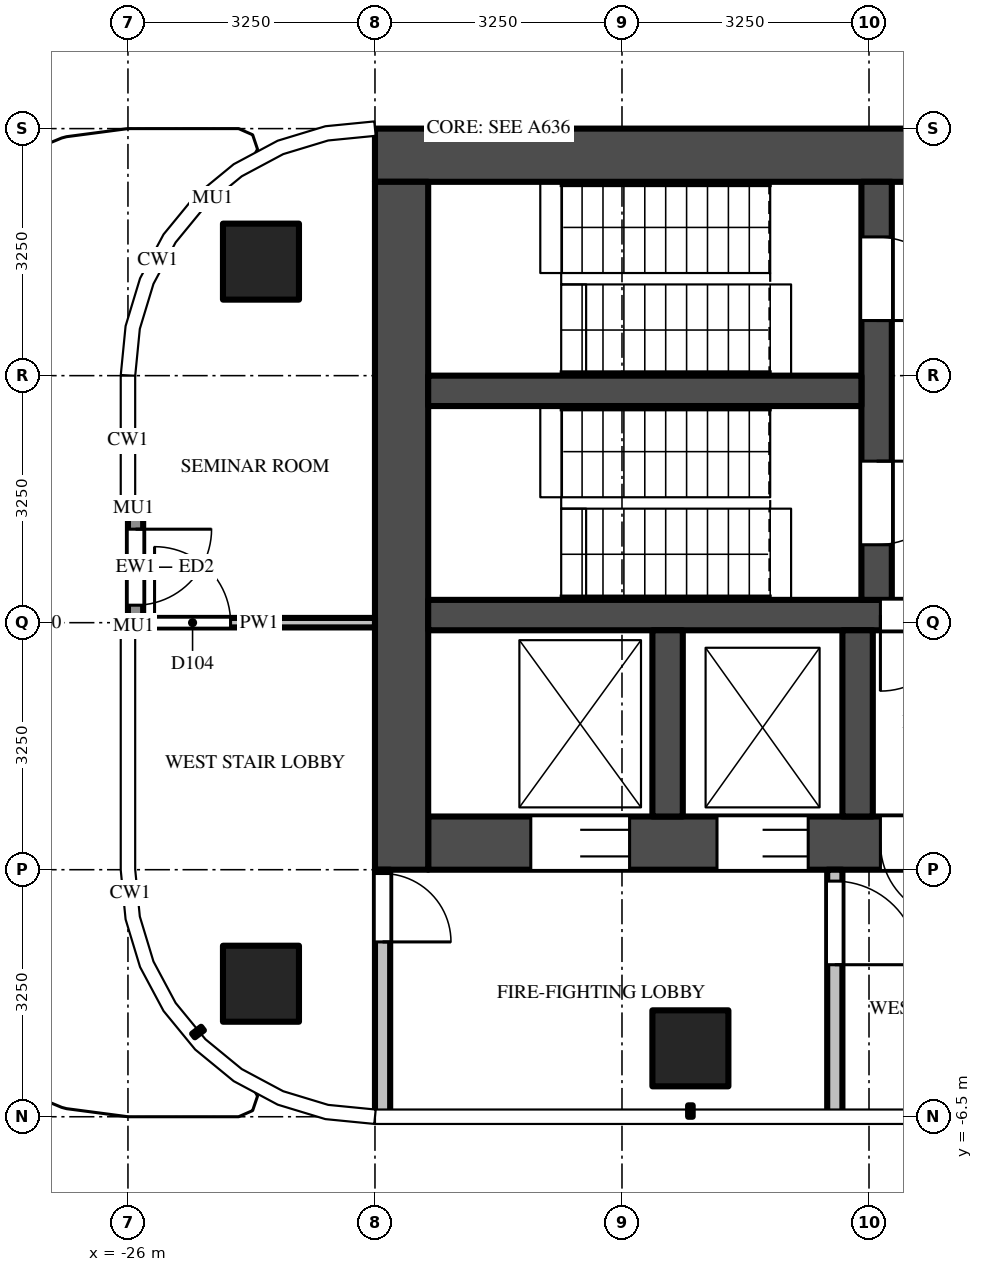
"""IFC4 building model, lengths in metres.
Left out: names, types, materials, properties, quantities, classifications, styles, units other than length and angle.
Written with IfcOpenShell. Run it as: python <this file> out.ifc"""

import sys

from ifc_helpers import new_model, si_unit, direction, frame, frame_2d, origin, origin_2d, place, context, subcontext, project, spatial, rectangle, extrude, source, transform, mapped, element, fill, save


model = new_model("IFC4")
c1 = context("Model", 3, precision=1e-05, world=origin(), true_north=direction((0.0, 1.0)))
c2 = subcontext(c1, "Body", "Model", "MODEL_VIEW")
j1 = project(units=[si_unit("LENGTHUNIT", "METRE"), si_unit("PLANEANGLEUNIT", "RADIAN")], contexts=[c1])
p1 = place(None, origin())
s1 = spatial("IfcSite", under=j1, at=p1, CompositionType="ELEMENT")
p2 = place(p1, origin())
s2 = spatial("IfcBuilding", under=s1, at=p2, CompositionType="ELEMENT")
p3 = place(p2, frame((0.0, 0.0, 279.4)))
s3 = spatial("IfcBuildingStorey", under=s2, at=p3, CompositionType="ELEMENT", Elevation=279.4)
m1 = source(origin(), c2, "Body", "SweptSolid", [
    extrude(rectangle(XDim=1.0, YDim=1.0, at=origin_2d()), origin(), (0.0, 0.0, 1.0), 3.9),
])
for number, where, z_axis, x_axis in (
    (1, (-18.6, -5.6, 0.0), (0.0, 0.0, 1.0), (1.0, 0.0, 0.0)),
    (2, (-24.25, -4.75, 0.0), (0.0, 0.0, 1.0), (1.0, 0.0, 0.0)),
    (3, (-24.25, 4.75, 0.0), (0.0, 0.0, 1.0), (1.0, 0.0, 0.0)),
):
    element("IfcColumn", number, at=place(p3, frame(where, z_axis=z_axis, x_axis=x_axis)), inside=s3, PredefinedType="COLUMN", context=c2, shape_type="MappedRepresentation", body=[
        mapped(m1, transform((0.0, 0.0, 0.0))),
    ])
m2 = source(origin(), c2, "Body", "SweptSolid", [
    extrude(rectangle(XDim=16.65, YDim=0.7, at=frame_2d((8.325, 0.0))), origin(), (0.0, 0.0, 1.0), 3.7),
])
p4 = place(p3, frame((-6.1, 6.15, 0.0), z_axis=(0.0, 0.0, 1.0), x_axis=(-1.0, 0.0, 0.0)))
e4 = element("IfcWall", 4, at=p4, inside=s3, PredefinedType="SHEAR", context=c2, shape_type="MappedRepresentation", body=[
    mapped(m2, transform((0.0, 0.0, 0.0))),
])
m3 = source(origin(), c2, "Body", "SweptSolid", [
    extrude(rectangle(XDim=14.85, YDim=0.7, at=frame_2d((7.425, 0.0))), origin(), (0.0, 0.0, 1.0), 3.7),
])
p5 = place(p3, frame((-7.2, -2.9, 0.0), z_axis=(0.0, 0.0, 1.0), x_axis=(-1.0, 0.0, 0.0)))
e5 = element("IfcWall", 5, at=p5, inside=s3, PredefinedType="SHEAR", context=c2, shape_type="MappedRepresentation", body=[
    mapped(m3, transform((0.0, 0.0, 0.0))),
])
m4 = source(origin(), c2, "Body", "SweptSolid", [
    extrude(rectangle(XDim=1.2, YDim=2.1, at=frame_2d((0.6, 1.05))), frame((0.0, 0.36, 0.0), z_axis=(0.0, -1.0, 0.0), x_axis=(1.0, 0.0, 0.0)), (0.0, 0.0, 1.0), 0.72),
])
p6 = place(p5, frame((5.7, 0.0, 0.0)))
e6 = element("IfcOpeningElement", 6, at=p6, cuts=e5, PredefinedType="OPENING", context=c2, shape_type="MappedRepresentation", body=[
    mapped(m4, transform((0.0, 0.0, 0.0))),
])
m5 = source(origin(), c2, "Body", "SweptSolid", [
    extrude(rectangle(XDim=1.3, YDim=2.1, at=frame_2d((0.65, 1.05))), frame((0.0, 0.36, 0.0), z_axis=(0.0, -1.0, 0.0), x_axis=(1.0, 0.0, 0.0)), (0.0, 0.0, 1.0), 0.72),
])
p7 = place(p5, frame((12.2, 0.0, 0.0)))
e7 = element("IfcOpeningElement", 7, at=p7, cuts=e5, PredefinedType="OPENING", context=c2, shape_type="MappedRepresentation", body=[
    mapped(m5, transform((0.0, 0.0, 0.0))),
])
p8 = place(p5, frame((9.85, 0.0, 0.0)))
e8 = element("IfcOpeningElement", 8, at=p8, cuts=e5, PredefinedType="OPENING", context=c2, shape_type="MappedRepresentation", body=[
    mapped(m4, transform((0.0, 0.0, 0.0))),
])
m6 = source(origin(), c2, "Body", "SweptSolid", [
    extrude(rectangle(XDim=1.0, YDim=2.1, at=frame_2d((0.5, 1.05))), frame((0.0, 0.36, 0.0), z_axis=(0.0, -1.0, 0.0), x_axis=(1.0, 0.0, 0.0)), (0.0, 0.0, 1.0), 0.72),
])
p9 = place(p5, frame((7.9, 0.0, 0.0)))
e9 = element("IfcOpeningElement", 9, at=p9, cuts=e5, PredefinedType="OPENING", context=c2, shape_type="MappedRepresentation", body=[
    mapped(m6, transform((0.0, 0.0, 0.0))),
])
m7 = source(origin(), c2, "Body", "SweptSolid", [
    extrude(rectangle(XDim=0.8, YDim=2.1, at=frame_2d((0.4, 1.05))), frame((0.0, 0.36, 0.0), z_axis=(0.0, -1.0, 0.0), x_axis=(1.0, 0.0, 0.0)), (0.0, 0.0, 1.0), 0.72),
])
p10 = place(p5, frame((0.212, 0.0, 0.0)))
e10 = element("IfcOpeningElement", 10, at=p10, cuts=e5, PredefinedType="OPENING", context=c2, shape_type="MappedRepresentation", body=[
    mapped(m7, transform((0.0, 0.0, 0.0))),
])
p11 = place(p5, frame((2.587, 0.0, 0.0)))
e11 = element("IfcOpeningElement", 11, at=p11, cuts=e5, PredefinedType="OPENING", context=c2, shape_type="MappedRepresentation", body=[
    mapped(m6, transform((0.0, 0.0, 0.0))),
])
m8 = source(origin(), c2, "Body", "SweptSolid", [
    extrude(rectangle(XDim=9.05, YDim=0.7, at=frame_2d((4.525, 0.0))), origin(), (0.0, 0.0, 1.0), 3.7),
])
p12 = place(p3, frame((-22.4, 5.8, 0.0), z_axis=(0.0, 0.0, 1.0), x_axis=(0.0, -1.0, 0.0)))
e12 = element("IfcWall", 12, at=p12, inside=s3, PredefinedType="SHEAR", context=c2, shape_type="MappedRepresentation", body=[
    mapped(m8, transform((0.0, 0.0, 0.0))),
])
m9 = source(origin(), c2, "Body", "SweptSolid", [
    extrude(rectangle(XDim=14.85, YDim=0.4, at=frame_2d((7.425, 0.0))), origin(), (0.0, 0.0, 1.0), 3.7),
])
p13 = place(p3, frame((-7.2, 0.1, 0.0), z_axis=(0.0, 0.0, 1.0), x_axis=(-1.0, 0.0, 0.0)))
e13 = element("IfcWall", 13, at=p13, inside=s3, PredefinedType="SHEAR", context=c2, shape_type="MappedRepresentation", body=[
    mapped(m9, transform((0.0, 0.0, 0.0))),
])
m10 = source(origin(), c2, "Body", "SweptSolid", [
    extrude(rectangle(XDim=1.0, YDim=2.1, at=frame_2d((0.5, 1.05))), frame((0.0, 0.21, 0.0), z_axis=(0.0, -1.0, 0.0), x_axis=(1.0, 0.0, 0.0)), (0.0, 0.0, 1.0), 0.42),
])
p14 = place(p13, frame((7.9, 0.0, 0.0)))
e14 = element("IfcOpeningElement", 14, at=p14, cuts=e13, PredefinedType="OPENING", context=c2, shape_type="MappedRepresentation", body=[
    mapped(m10, transform((0.0, 0.0, 0.0))),
])
m11 = source(origin(), c2, "Body", "SweptSolid", [
    extrude(rectangle(XDim=5.5, YDim=0.4, at=frame_2d((2.75, 0.0))), origin(), (0.0, 0.0, 1.0), 3.7),
])
p15 = place(p3, frame((-16.15, 5.8, 0.0), z_axis=(0.0, 0.0, 1.0), x_axis=(0.0, -1.0, 0.0)))
e15 = element("IfcWall", 15, at=p15, inside=s3, PredefinedType="SHEAR", context=c2, shape_type="MappedRepresentation", body=[
    mapped(m11, transform((0.0, 0.0, 0.0))),
])
m12 = source(origin(), c2, "Body", "SweptSolid", [
    extrude(rectangle(XDim=1.1, YDim=2.1, at=frame_2d((0.55, 1.05))), frame((0.0, 0.21, 0.0), z_axis=(0.0, -1.0, 0.0), x_axis=(1.0, 0.0, 0.0)), (0.0, 0.0, 1.0), 0.42),
])
p16 = place(p15, frame((0.725, 0.0, 0.0)))
e16 = element("IfcOpeningElement", 16, at=p16, cuts=e15, PredefinedType="OPENING", context=c2, shape_type="MappedRepresentation", body=[
    mapped(m12, transform((0.0, 0.0, 0.0))),
])
p17 = place(p15, frame((3.675, 0.0, 0.0)))
e17 = element("IfcOpeningElement", 17, at=p17, cuts=e15, PredefinedType="OPENING", context=c2, shape_type="MappedRepresentation", body=[
    mapped(m12, transform((0.0, 0.0, 0.0))),
])
m13 = source(origin(), c2, "Body", "SweptSolid", [
    extrude(rectangle(XDim=5.7, YDim=0.4, at=frame_2d((2.85, 0.0))), origin(), (0.0, 0.0, 1.0), 3.7),
])
p18 = place(p3, frame((-16.35, 3.05, 0.0), z_axis=(0.0, 0.0, 1.0), x_axis=(-1.0, 0.0, 0.0)))
e18 = element("IfcWall", 18, at=p18, inside=s3, PredefinedType="SHEAR", context=c2, shape_type="MappedRepresentation", body=[
    mapped(m13, transform((0.0, 0.0, 0.0))),
])
m14 = source(origin(), c2, "Body", "SweptSolid", [
    extrude(rectangle(XDim=2.45, YDim=0.4, at=frame_2d((1.225, 0.0))), origin(), (0.0, 0.0, 1.0), 3.7),
])
for number, where, z_axis, x_axis in (
    (19, (-16.4, -0.1, 0.0), (0.0, 0.0, 1.0), (0.0, -1.0, 0.0)),
    (20, (-18.9, -0.1, 0.0), (0.0, 0.0, 1.0), (0.0, -1.0, 0.0)),
):
    element("IfcWall", number, at=place(p3, frame(where, z_axis=z_axis, x_axis=x_axis)), inside=s3, PredefinedType="SHEAR", context=c2, shape_type="MappedRepresentation", body=[
        mapped(m14, transform((0.0, 0.0, 0.0))),
    ])
m15 = source(origin(), c2, "Body", "SweptSolid", [
    extrude(rectangle(XDim=3.25, YDim=0.2, at=frame_2d((1.625, 0.0))), origin(), (0.0, 0.0, 1.0), 3.7),
])
p19 = place(p3, frame((-16.7, -3.25, 0.0), z_axis=(0.0, 0.0, 1.0), x_axis=(0.0, -1.0, 0.0)))
e21 = element("IfcWall", 21, at=p19, inside=s3, PredefinedType="PARTITIONING", context=c2, shape_type="MappedRepresentation", body=[
    mapped(m15, transform((0.0, 0.0, 0.0))),
])
m16 = source(origin(), c2, "Body", "SweptSolid", [
    extrude(rectangle(XDim=1.1, YDim=2.1, at=frame_2d((0.55, 1.05))), frame((0.0, 0.11, 0.0), z_axis=(0.0, -1.0, 0.0), x_axis=(1.0, 0.0, 0.0)), (0.0, 0.0, 1.0), 0.22),
])
p20 = place(p19, frame((0.15, 0.0, 0.0)))
e22 = element("IfcOpeningElement", 22, at=p20, cuts=e21, PredefinedType="OPENING", context=c2, shape_type="MappedRepresentation", body=[
    mapped(m16, transform((0.0, 0.0, 0.0))),
])
p21 = place(p3, frame((-22.65, -3.25, 0.0), z_axis=(0.0, 0.0, 1.0), x_axis=(0.0, -1.0, 0.0)))
e23 = element("IfcWall", 23, at=p21, inside=s3, PredefinedType="PARTITIONING", context=c2, shape_type="MappedRepresentation", body=[
    mapped(m15, transform((0.0, 0.0, 0.0))),
])
m17 = source(origin(), c2, "Body", "SweptSolid", [
    extrude(rectangle(XDim=0.9, YDim=2.1, at=frame_2d((0.45, 1.05))), frame((0.0, 0.11, 0.0), z_axis=(0.0, -1.0, 0.0), x_axis=(1.0, 0.0, 0.0)), (0.0, 0.0, 1.0), 0.22),
])
p22 = place(p21, frame((0.05, 0.0, 0.0)))
e24 = element("IfcOpeningElement", 24, at=p22, cuts=e23, PredefinedType="OPENING", context=c2, shape_type="MappedRepresentation", body=[
    mapped(m17, transform((0.0, 0.0, 0.0))),
])
m18 = source(origin(), c2, "Body", "SweptSolid", [
    extrude(rectangle(XDim=1.5, YDim=0.2, at=frame_2d((0.75, 0.0))), origin(), (0.0, 0.0, 1.0), 3.7),
])
p23 = place(p3, frame((-25.9, 1.48, 0.0), z_axis=(0.0, 0.0, 1.0), x_axis=(0.0, -1.0, 0.0)))
e25 = element("IfcWall", 25, at=p23, inside=s3, PredefinedType="SOLIDWALL", context=c2, shape_type="MappedRepresentation", body=[
    mapped(m18, transform((0.0, 0.0, 0.0))),
])
m19 = source(origin(), c2, "Body", "SweptSolid", [
    extrude(rectangle(XDim=1.0, YDim=2.4, at=frame_2d((0.5, 1.2))), frame((0.0, 0.11, 0.0), z_axis=(0.0, -1.0, 0.0), x_axis=(1.0, 0.0, 0.0)), (0.0, 0.0, 1.0), 0.22),
])
p24 = place(p23, frame((0.25, 0.0, 0.0)))
e26 = element("IfcOpeningElement", 26, at=p24, cuts=e25, PredefinedType="OPENING", context=c2, shape_type="MappedRepresentation", body=[
    mapped(m19, transform((0.0, 0.0, 0.0))),
])
m20 = source(origin(), c2, "Body", "SweptSolid", [
    extrude(rectangle(XDim=3.05, YDim=0.125, at=frame_2d((1.525, 0.0))), origin(), (0.0, 0.0, 1.0), 2.78),
])
p25 = place(p3, frame((-25.8, 0.0, 0.0), z_axis=(0.0, 0.0, 1.0), x_axis=(1.0, 0.0, 0.0)))
e27 = element("IfcWall", 27, at=p25, inside=s3, PredefinedType="PARTITIONING", context=c2, shape_type="MappedRepresentation", body=[
    mapped(m20, transform((0.0, 0.0, 0.0))),
])
m21 = source(origin(), c2, "Body", "SweptSolid", [
    extrude(rectangle(XDim=1.0, YDim=2.1, at=frame_2d((0.5, 1.05))), frame((0.0, 0.073, 0.0), z_axis=(0.0, -1.0, 0.0), x_axis=(1.0, 0.0, 0.0)), (0.0, 0.0, 1.0), 0.145),
])
p26 = place(p25, frame((0.15, 0.0, 0.0)))
e28 = element("IfcOpeningElement", 28, at=p26, cuts=e27, PredefinedType="OPENING", context=c2, shape_type="MappedRepresentation", body=[
    mapped(m21, transform((0.0, 0.0, 0.0))),
])
m22 = source(origin(), c2, "Body", "SweptSolid", [
    extrude(rectangle(XDim=1.3, YDim=2.1, at=frame_2d((0.65, 1.05))), frame((0.0, -0.275, 0.0), z_axis=(0.0, -1.0, 0.0), x_axis=(1.0, 0.0, 0.0)), (0.0, 0.0, 1.0), 0.05),
])
p27 = place(p7, origin())
e29 = element("IfcDoor", 29, at=p27, inside=s3, OperationType="DOUBLE_DOOR_SLIDING", PredefinedType="DOOR", context=c2, shape_type="MappedRepresentation", body=[
    mapped(m22, transform((0.0, 0.0, 0.0))),
])
fill(e7, e29)
m23 = source(origin(), c2, "Body", "SweptSolid", [
    extrude(rectangle(XDim=1.2, YDim=2.1, at=frame_2d((0.6, 1.05))), frame((0.0, -0.275, 0.0), z_axis=(0.0, -1.0, 0.0), x_axis=(1.0, 0.0, 0.0)), (0.0, 0.0, 1.0), 0.05),
])
p28 = place(p8, origin())
e30 = element("IfcDoor", 30, at=p28, inside=s3, OperationType="DOUBLE_DOOR_SLIDING", PredefinedType="DOOR", context=c2, shape_type="MappedRepresentation", body=[
    mapped(m23, transform((0.0, 0.0, 0.0))),
])
fill(e8, e30)
m24 = source(origin(), c2, "Body", "SweptSolid", [
    extrude(rectangle(XDim=1.1, YDim=2.1, at=frame_2d((0.55, 1.05))), frame((0.0, 0.025, 0.0), z_axis=(0.0, -1.0, 0.0), x_axis=(1.0, 0.0, 0.0)), (0.0, 0.0, 1.0), 0.05),
])
p29 = place(p16, origin())
e31 = element("IfcDoor", 31, at=p29, inside=s3, OperationType="SINGLE_SWING_RIGHT", PredefinedType="DOOR", context=c2, shape_type="MappedRepresentation", body=[
    mapped(m24, transform((0.0, 0.0, 0.0))),
])
fill(e16, e31)
p30 = place(p17, origin())
e32 = element("IfcDoor", 32, at=p30, inside=s3, OperationType="SINGLE_SWING_LEFT", PredefinedType="DOOR", context=c2, shape_type="MappedRepresentation", body=[
    mapped(m24, transform((0.0, 0.0, 0.0))),
])
fill(e17, e32)
m25 = source(origin(), c2, "Body", "SweptSolid", [
    extrude(rectangle(XDim=1.0, YDim=2.1, at=frame_2d((0.5, 1.05))), frame((0.0, 0.025, 0.0), z_axis=(0.0, -1.0, 0.0), x_axis=(1.0, 0.0, 0.0)), (0.0, 0.0, 1.0), 0.05),
])
p31 = place(p14, origin())
e33 = element("IfcDoor", 33, at=p31, inside=s3, OperationType="SINGLE_SWING_RIGHT", PredefinedType="DOOR", context=c2, shape_type="MappedRepresentation", body=[
    mapped(m25, transform((0.0, 0.0, 0.0))),
])
fill(e14, e33)
m26 = source(origin(), c2, "Body", "SweptSolid", [
    extrude(rectangle(XDim=1.0, YDim=2.1, at=frame_2d((0.5, 1.05))), frame((0.0, -0.275, 0.0), z_axis=(0.0, -1.0, 0.0), x_axis=(1.0, 0.0, 0.0)), (0.0, 0.0, 1.0), 0.05),
])
p32 = place(p9, origin())
e34 = element("IfcDoor", 34, at=p32, inside=s3, OperationType="SINGLE_SWING_LEFT", PredefinedType="DOOR", context=c2, shape_type="MappedRepresentation", body=[
    mapped(m26, transform((0.0, 0.0, 0.0))),
])
fill(e9, e34)
p33 = place(p20, origin())
e35 = element("IfcDoor", 35, at=p33, inside=s3, OperationType="SINGLE_SWING_RIGHT", PredefinedType="DOOR", context=c2, shape_type="MappedRepresentation", body=[
    mapped(m24, transform((0.0, 0.0, 0.0))),
])
fill(e22, e35)
m27 = source(origin(), c2, "Body", "SweptSolid", [
    extrude(rectangle(XDim=0.9, YDim=2.1, at=frame_2d((0.45, 1.05))), frame((0.0, 0.025, 0.0), z_axis=(0.0, -1.0, 0.0), x_axis=(1.0, 0.0, 0.0)), (0.0, 0.0, 1.0), 0.05),
])
p34 = place(p22, origin())
e36 = element("IfcDoor", 36, at=p34, inside=s3, OperationType="SINGLE_SWING_RIGHT", PredefinedType="DOOR", context=c2, shape_type="MappedRepresentation", body=[
    mapped(m27, transform((0.0, 0.0, 0.0))),
])
fill(e24, e36)
m28 = source(origin(), c2, "Body", "SweptSolid", [
    extrude(rectangle(XDim=1.0, YDim=2.4, at=frame_2d((0.5, 1.2))), frame((0.0, 0.025, 0.0), z_axis=(0.0, -1.0, 0.0), x_axis=(1.0, 0.0, 0.0)), (0.0, 0.0, 1.0), 0.05),
])
p35 = place(p24, origin())
e37 = element("IfcDoor", 37, at=p35, inside=s3, OperationType="SINGLE_SWING_LEFT", PredefinedType="DOOR", context=c2, shape_type="MappedRepresentation", body=[
    mapped(m28, transform((0.0, 0.0, 0.0))),
])
fill(e26, e37)
p36 = place(p26, origin())
e38 = element("IfcDoor", 38, at=p36, inside=s3, OperationType="SINGLE_SWING_LEFT", PredefinedType="DOOR", context=c2, shape_type="MappedRepresentation", body=[
    mapped(m25, transform((0.0, 0.0, 0.0))),
])
fill(e28, e38)
save(model, sys.argv[1])
